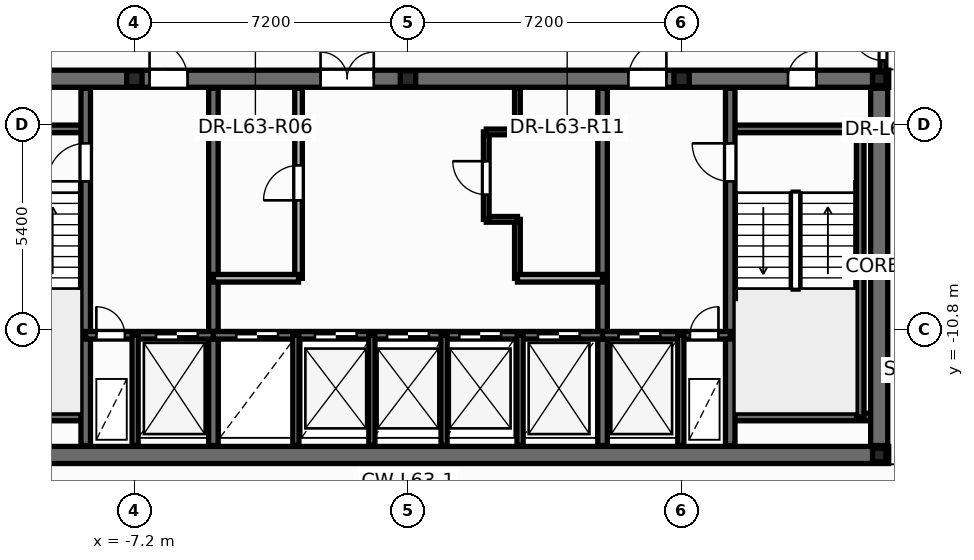
"""IFC4 building model, lengths in metres.
Left out: names, types, materials, properties, quantities, classifications, styles, units other than length and angle.
Written with IfcOpenShell. Run it as: python <this file> out.ifc"""

import sys

from ifc_helpers import new_model, si_unit, direction, frame, frame_2d, origin, origin_2d, place, context, subcontext, project, spatial, rectangle, i_section, extrude, element, fill, save


model = new_model("IFC4")
c1 = context("Model", 3, precision=1e-05, world=origin(), true_north=direction((0.0, 1.0)))
c2 = subcontext(c1, "Body", "Model", "MODEL_VIEW")
j1 = project(units=[si_unit("LENGTHUNIT", "METRE"), si_unit("PLANEANGLEUNIT", "RADIAN")], contexts=[c1])
p1 = place(None, origin())
s1 = spatial("IfcSite", under=j1, at=p1, CompositionType="ELEMENT")
p2 = place(p1, origin())
s2 = spatial("IfcBuilding", under=s1, at=p2, CompositionType="ELEMENT")
p3 = place(p2, frame((0.0, 0.0, 240.6)))
s3 = spatial("IfcBuildingStorey", under=s2, at=p3, CompositionType="ELEMENT", Elevation=240.6)
for number, where, z_axis, x_axis in (
    (1, (12.4, -14.1, 0.0), (0.0, 0.0, 1.0), (1.0, 0.0, 0.0)),
    (2, (12.4, -4.2, 0.0), (0.0, 0.0, 1.0), (1.0, 0.0, 0.0)),
):
    element("IfcColumn", number, at=place(p3, frame(where, z_axis=z_axis, x_axis=x_axis)), inside=s3, PredefinedType="COLUMN", context=c2, shape_type="SweptSolid", body=[
        extrude(i_section(OverallWidth=0.352, OverallDepth=0.359, WebThickness=0.018, FlangeThickness=0.026, at=origin_2d()), origin(), (0.0, 0.0, 1.0), 3.6),
    ])
for number, where, z_axis, x_axis in (
    (3, (-7.2, -4.2, 0.0), (0.0, 0.0, 1.0), (1.0, 0.0, 0.0)),
    (4, (0.0, -4.2, 0.0), (0.0, 0.0, 1.0), (1.0, 0.0, 0.0)),
    (5, (7.2, -4.2, 0.0), (0.0, 0.0, 1.0), (1.0, 0.0, 0.0)),
):
    element("IfcColumn", number, at=place(p3, frame(where, z_axis=z_axis, x_axis=x_axis)), inside=s3, PredefinedType="PILASTER", context=c2, shape_type="SweptSolid", body=[
        extrude(i_section(OverallWidth=0.405, OverallDepth=0.414, WebThickness=0.022, FlangeThickness=0.032, at=origin_2d()), origin(), (0.0, 0.0, 1.0), 3.6),
    ])
p4 = place(p3, frame((2.88, -9.45, 0.0), z_axis=(0.0, 0.0, 1.0), x_axis=(0.0, 1.0, 0.0)))
e6 = element("IfcWall", 6, at=p4, inside=s3, PredefinedType="PARTITIONING", context=c2, shape_type="SweptSolid", body=[
    extrude(rectangle(XDim=1.55, YDim=0.15, at=frame_2d((0.775, 0.0))), origin(), (0.0, 0.0, 1.0), 3.28),
])
p5 = place(p3, frame((2.06, -7.9, 0.0), z_axis=(0.0, 0.0, 1.0), x_axis=(1.0, 0.0, 0.0)))
e7 = element("IfcWall", 7, at=p5, inside=s3, PredefinedType="PARTITIONING", context=c2, shape_type="SweptSolid", body=[
    extrude(rectangle(XDim=0.82, YDim=0.15, at=frame_2d((0.41, 0.0))), origin(), (0.0, 0.0, 1.0), 3.28),
])
p6 = place(p3, frame((2.06, -7.9, 0.0), z_axis=(0.0, 0.0, 1.0), x_axis=(0.0, 1.0, 0.0)))
e8 = element("IfcWall", 8, at=p6, inside=s3, PredefinedType="PARTITIONING", context=c2, shape_type="SweptSolid", body=[
    extrude(rectangle(XDim=2.3, YDim=0.15, at=frame_2d((1.15, 0.0))), origin(), (0.0, 0.0, 1.0), 3.28),
])
p7 = place(p6, frame((0.65, 0.0, 0.0)))
e9 = element("IfcOpeningElement", 9, at=p7, cuts=e8, PredefinedType="OPENING", context=c2, shape_type="SweptSolid", body=[
    extrude(rectangle(XDim=0.886, YDim=2.104, at=frame_2d((0.44, 1.052))), frame((0.0, 0.085, 0.0), z_axis=(0.0, -1.0, 0.0), x_axis=(1.0, 0.0, 0.0)), (0.0, 0.0, 1.0), 0.17),
])
p8 = place(p3, frame((2.06, -5.6, 0.0), z_axis=(0.0, 0.0, 1.0), x_axis=(1.0, 0.0, 0.0)))
e10 = element("IfcWall", 10, at=p8, inside=s3, PredefinedType="PARTITIONING", context=c2, shape_type="SweptSolid", body=[
    extrude(rectangle(XDim=0.82, YDim=0.15, at=frame_2d((0.41, 0.0))), origin(), (0.0, 0.0, 1.0), 3.28),
])
p9 = place(p3, frame((2.88, -5.6, 0.0), z_axis=(0.0, 0.0, 1.0), x_axis=(0.0, 1.0, 0.0)))
e11 = element("IfcWall", 11, at=p9, inside=s3, PredefinedType="PARTITIONING", context=c2, shape_type="SweptSolid", body=[
    extrude(rectangle(XDim=1.15, YDim=0.15, at=frame_2d((0.575, 0.0))), origin(), (0.0, 0.0, 1.0), 3.28),
])
p10 = place(p3, frame((-12.65, -14.1, 0.0), z_axis=(0.0, 0.0, 1.0), x_axis=(1.0, 0.0, 0.0)))
e12 = element("IfcWall", 12, at=p10, inside=s3, PredefinedType="SHEAR", context=c2, shape_type="SweptSolid", body=[
    extrude(rectangle(XDim=25.3, YDim=0.45, at=frame_2d((12.65, 0.0))), origin(), (0.0, 0.0, 1.0), 3.6),
])
p11 = place(p3, frame((-12.65, -4.2, 0.0), z_axis=(0.0, 0.0, 1.0), x_axis=(1.0, 0.0, 0.0)))
e13 = element("IfcWall", 13, at=p11, inside=s3, PredefinedType="SHEAR", context=c2, shape_type="SweptSolid", body=[
    extrude(rectangle(XDim=25.3, YDim=0.45, at=frame_2d((12.65, 0.0))), origin(), (0.0, 0.0, 1.0), 3.6),
])
p12 = place(p11, frame((1.85, 0.0, 0.0)))
e14 = element("IfcOpeningElement", 14, at=p12, cuts=e13, PredefinedType="OPENING", context=c2, shape_type="SweptSolid", body=[
    extrude(rectangle(XDim=0.756, YDim=2.054, at=frame_2d((0.375, 1.027))), frame((0.0, 0.235, 0.0), z_axis=(0.0, -1.0, 0.0), x_axis=(1.0, 0.0, 0.0)), (0.0, 0.0, 1.0), 0.47),
])
p13 = place(p11, frame((22.65, 0.0, 0.0)))
e15 = element("IfcOpeningElement", 15, at=p13, cuts=e13, PredefinedType="OPENING", context=c2, shape_type="SweptSolid", body=[
    extrude(rectangle(XDim=0.756, YDim=2.054, at=frame_2d((0.375, 1.027))), frame((0.0, 0.235, 0.0), z_axis=(0.0, -1.0, 0.0), x_axis=(1.0, 0.0, 0.0)), (0.0, 0.0, 1.0), 0.47),
])
p14 = place(p11, frame((5.85, 0.0, 0.0)))
e16 = element("IfcOpeningElement", 16, at=p14, cuts=e13, PredefinedType="OPENING", context=c2, shape_type="SweptSolid", body=[
    extrude(rectangle(XDim=1.006, YDim=2.104, at=frame_2d((0.5, 1.052))), frame((0.0, 0.235, 0.0), z_axis=(0.0, -1.0, 0.0), x_axis=(1.0, 0.0, 0.0)), (0.0, 0.0, 1.0), 0.47),
])
p15 = place(p11, frame((10.35, 0.0, 0.0)))
e17 = element("IfcOpeningElement", 17, at=p15, cuts=e13, PredefinedType="OPENING", context=c2, shape_type="SweptSolid", body=[
    extrude(rectangle(XDim=1.406, YDim=2.154, at=frame_2d((0.7, 1.077))), frame((0.0, 0.235, 0.0), z_axis=(0.0, -1.0, 0.0), x_axis=(1.0, 0.0, 0.0)), (0.0, 0.0, 1.0), 0.47),
])
p16 = place(p11, frame((18.45, 0.0, 0.0)))
e18 = element("IfcOpeningElement", 18, at=p16, cuts=e13, PredefinedType="OPENING", context=c2, shape_type="SweptSolid", body=[
    extrude(rectangle(XDim=1.006, YDim=2.104, at=frame_2d((0.5, 1.052))), frame((0.0, 0.235, 0.0), z_axis=(0.0, -1.0, 0.0), x_axis=(1.0, 0.0, 0.0)), (0.0, 0.0, 1.0), 0.47),
])
for number, where, z_axis, x_axis in (
    (19, (-12.35, -5.52, 0.0), (0.0, 0.0, 1.0), (1.0, 0.0, 0.0)),
    (20, (-12.35, -13.1, 0.0), (0.0, 0.0, 1.0), (1.0, 0.0, 0.0)),
    (21, (8.48, -5.52, 0.0), (0.0, 0.0, 1.0), (1.0, 0.0, 0.0)),
    (22, (8.48, -13.1, 0.0), (0.0, 0.0, 1.0), (1.0, 0.0, 0.0)),
):
    element("IfcWall", number, at=place(p3, frame(where, z_axis=z_axis, x_axis=x_axis)), inside=s3, PredefinedType="SOLIDWALL", context=c2, shape_type="SweptSolid", body=[
        extrude(rectangle(XDim=3.87, YDim=0.2, at=frame_2d((1.935, 0.0))), origin(), (0.0, 0.0, 1.0), 3.6),
    ])
p17 = place(p3, frame((11.9, -13.1, 0.0), z_axis=(0.0, 0.0, 1.0), x_axis=(0.0, 1.0, 0.0)))
e23 = element("IfcWall", 23, at=p17, inside=s3, PredefinedType="SOLIDWALL", context=c2, shape_type="SweptSolid", body=[
    extrude(rectangle(XDim=7.58, YDim=0.2, at=frame_2d((3.79, 0.0))), origin(), (0.0, 0.0, 1.0), 3.6),
])
p18 = place(p3, frame((-8.48, -13.85, 0.0), z_axis=(0.0, 0.0, 1.0), x_axis=(0.0, 1.0, 0.0)))
e24 = element("IfcWall", 24, at=p18, inside=s3, PredefinedType="SHEAR", context=c2, shape_type="SweptSolid", body=[
    extrude(rectangle(XDim=9.4, YDim=0.25, at=frame_2d((4.7, 0.0))), origin(), (0.0, 0.0, 1.0), 3.6),
])
p19 = place(p18, frame((6.95, 0.0, 0.0)))
e25 = element("IfcOpeningElement", 25, at=p19, cuts=e24, PredefinedType="OPENING", context=c2, shape_type="SweptSolid", body=[
    extrude(rectangle(XDim=1.006, YDim=2.104, at=frame_2d((0.5, 1.052))), frame((0.0, 0.135, 0.0), z_axis=(0.0, -1.0, 0.0), x_axis=(1.0, 0.0, 0.0)), (0.0, 0.0, 1.0), 0.27),
])
p20 = place(p3, frame((8.48, -13.85, 0.0), z_axis=(0.0, 0.0, 1.0), x_axis=(0.0, 1.0, 0.0)))
e26 = element("IfcWall", 26, at=p20, inside=s3, PredefinedType="SHEAR", context=c2, shape_type="SweptSolid", body=[
    extrude(rectangle(XDim=9.4, YDim=0.25, at=frame_2d((4.7, 0.0))), origin(), (0.0, 0.0, 1.0), 3.6),
])
p21 = place(p20, frame((6.95, 0.0, 0.0)))
e27 = element("IfcOpeningElement", 27, at=p21, cuts=e26, PredefinedType="OPENING", context=c2, shape_type="SweptSolid", body=[
    extrude(rectangle(XDim=1.006, YDim=2.104, at=frame_2d((0.5, 1.052))), frame((0.0, 0.135, 0.0), z_axis=(0.0, -1.0, 0.0), x_axis=(1.0, 0.0, 0.0)), (0.0, 0.0, 1.0), 0.27),
])
for number, where, z_axis, x_axis in (
    (28, (-5.12, -13.85, 0.0), (0.0, 0.0, 1.0), (0.0, 1.0, 0.0)),
    (29, (5.12, -13.85, 0.0), (0.0, 0.0, 1.0), (0.0, 1.0, 0.0)),
):
    element("IfcWall", number, at=place(p3, frame(where, z_axis=z_axis, x_axis=x_axis)), inside=s3, PredefinedType="SHEAR", context=c2, shape_type="SweptSolid", body=[
        extrude(rectangle(XDim=9.4, YDim=0.25, at=frame_2d((4.7, 0.0))), origin(), (0.0, 0.0, 1.0), 3.6),
    ])
p22 = place(p3, frame((-8.48, -10.95, 0.0), z_axis=(0.0, 0.0, 1.0), x_axis=(1.0, 0.0, 0.0)))
e30 = element("IfcWall", 30, at=p22, inside=s3, PredefinedType="SOLIDWALL", context=c2, shape_type="SweptSolid", body=[
    extrude(rectangle(XDim=3.36, YDim=0.2, at=frame_2d((1.68, 0.0))), origin(), (0.0, 0.0, 1.0), 3.6),
])
p23 = place(p22, frame((0.28, 0.0, 0.0)))
e31 = element("IfcOpeningElement", 31, at=p23, cuts=e30, PredefinedType="OPENING", context=c2, shape_type="SweptSolid", body=[
    extrude(rectangle(XDim=0.756, YDim=2.054, at=frame_2d((0.375, 1.027))), frame((0.0, 0.11, 0.0), z_axis=(0.0, -1.0, 0.0), x_axis=(1.0, 0.0, 0.0)), (0.0, 0.0, 1.0), 0.22),
])
p24 = place(p22, frame((1.85, 0.0, 0.0)))
e32 = element("IfcOpeningElement", 32, at=p24, cuts=e30, PredefinedType="OPENING", context=c2, shape_type="SweptSolid", body=[
    extrude(rectangle(XDim=1.106, YDim=2.104, at=frame_2d((0.55, 1.052))), frame((0.0, 0.11, 0.0), z_axis=(0.0, -1.0, 0.0), x_axis=(1.0, 0.0, 0.0)), (0.0, 0.0, 1.0), 0.22),
])
p25 = place(p3, frame((-5.12, -10.95, 0.0), z_axis=(0.0, 0.0, 1.0), x_axis=(1.0, 0.0, 0.0)))
e33 = element("IfcWall", 33, at=p25, inside=s3, PredefinedType="SOLIDWALL", context=c2, shape_type="SweptSolid", body=[
    extrude(rectangle(XDim=10.24, YDim=0.2, at=frame_2d((5.12, 0.0))), origin(), (0.0, 0.0, 1.0), 3.6),
])
p26 = place(p25, frame((0.6, 0.0, 0.0)))
e34 = element("IfcOpeningElement", 34, at=p26, cuts=e33, PredefinedType="OPENING", context=c2, shape_type="SweptSolid", body=[
    extrude(rectangle(XDim=1.106, YDim=2.104, at=frame_2d((0.55, 1.052))), frame((0.0, 0.11, 0.0), z_axis=(0.0, -1.0, 0.0), x_axis=(1.0, 0.0, 0.0)), (0.0, 0.0, 1.0), 0.22),
])
p27 = place(p25, frame((2.67, 0.0, 0.0)))
e35 = element("IfcOpeningElement", 35, at=p27, cuts=e33, PredefinedType="OPENING", context=c2, shape_type="SweptSolid", body=[
    extrude(rectangle(XDim=1.106, YDim=2.104, at=frame_2d((0.55, 1.052))), frame((0.0, 0.11, 0.0), z_axis=(0.0, -1.0, 0.0), x_axis=(1.0, 0.0, 0.0)), (0.0, 0.0, 1.0), 0.22),
])
p28 = place(p25, frame((4.57, 0.0, 0.0)))
e36 = element("IfcOpeningElement", 36, at=p28, cuts=e33, PredefinedType="OPENING", context=c2, shape_type="SweptSolid", body=[
    extrude(rectangle(XDim=1.106, YDim=2.104, at=frame_2d((0.55, 1.052))), frame((0.0, 0.11, 0.0), z_axis=(0.0, -1.0, 0.0), x_axis=(1.0, 0.0, 0.0)), (0.0, 0.0, 1.0), 0.22),
])
p29 = place(p25, frame((6.47, 0.0, 0.0)))
e37 = element("IfcOpeningElement", 37, at=p29, cuts=e33, PredefinedType="OPENING", context=c2, shape_type="SweptSolid", body=[
    extrude(rectangle(XDim=1.106, YDim=2.104, at=frame_2d((0.55, 1.052))), frame((0.0, 0.11, 0.0), z_axis=(0.0, -1.0, 0.0), x_axis=(1.0, 0.0, 0.0)), (0.0, 0.0, 1.0), 0.22),
])
p30 = place(p25, frame((8.54, 0.0, 0.0)))
e38 = element("IfcOpeningElement", 38, at=p30, cuts=e33, PredefinedType="OPENING", context=c2, shape_type="SweptSolid", body=[
    extrude(rectangle(XDim=1.106, YDim=2.104, at=frame_2d((0.55, 1.052))), frame((0.0, 0.11, 0.0), z_axis=(0.0, -1.0, 0.0), x_axis=(1.0, 0.0, 0.0)), (0.0, 0.0, 1.0), 0.22),
])
p31 = place(p3, frame((5.12, -10.95, 0.0), z_axis=(0.0, 0.0, 1.0), x_axis=(1.0, 0.0, 0.0)))
e39 = element("IfcWall", 39, at=p31, inside=s3, PredefinedType="SOLIDWALL", context=c2, shape_type="SweptSolid", body=[
    extrude(rectangle(XDim=3.36, YDim=0.2, at=frame_2d((1.68, 0.0))), origin(), (0.0, 0.0, 1.0), 3.6),
])
p32 = place(p31, frame((0.42, 0.0, 0.0)))
e40 = element("IfcOpeningElement", 40, at=p32, cuts=e39, PredefinedType="OPENING", context=c2, shape_type="SweptSolid", body=[
    extrude(rectangle(XDim=1.106, YDim=2.104, at=frame_2d((0.55, 1.052))), frame((0.0, 0.11, 0.0), z_axis=(0.0, -1.0, 0.0), x_axis=(1.0, 0.0, 0.0)), (0.0, 0.0, 1.0), 0.22),
])
p33 = place(p31, frame((2.3, 0.0, 0.0)))
e41 = element("IfcOpeningElement", 41, at=p33, cuts=e39, PredefinedType="OPENING", context=c2, shape_type="SweptSolid", body=[
    extrude(rectangle(XDim=0.756, YDim=2.054, at=frame_2d((0.375, 1.027))), frame((0.0, 0.11, 0.0), z_axis=(0.0, -1.0, 0.0), x_axis=(1.0, 0.0, 0.0)), (0.0, 0.0, 1.0), 0.22),
])
for number, where, z_axis, x_axis in (
    (42, (-7.18, -13.85, 0.0), (0.0, 0.0, 1.0), (0.0, 1.0, 0.0)),
    (43, (7.18, -13.85, 0.0), (0.0, 0.0, 1.0), (0.0, 1.0, 0.0)),
    (44, (-2.95, -13.85, 0.0), (0.0, 0.0, 1.0), (0.0, 1.0, 0.0)),
    (45, (2.95, -13.85, 0.0), (0.0, 0.0, 1.0), (0.0, 1.0, 0.0)),
):
    element("IfcWall", number, at=place(p3, frame(where, z_axis=z_axis, x_axis=x_axis)), inside=s3, PredefinedType="PARTITIONING", context=c2, shape_type="SweptSolid", body=[
        extrude(rectangle(XDim=2.9, YDim=0.16, at=frame_2d((1.45, 0.0))), origin(), (0.0, 0.0, 1.0), 2.505),
    ])
p34 = place(p3, frame((12.4, -13.85, 0.0), z_axis=(0.0, 0.0, 1.0), x_axis=(0.0, 1.0, 0.0)))
e46 = element("IfcWall", 46, at=p34, inside=s3, PredefinedType="SHEAR", context=c2, shape_type="SweptSolid", body=[
    extrude(rectangle(XDim=9.4, YDim=0.45, at=frame_2d((4.7, 0.0))), origin(), (0.0, 0.0, 1.0), 3.6),
])
p35 = place(p3, frame((-2.88, -9.45, 0.0), z_axis=(0.0, 0.0, 1.0), x_axis=(0.0, 1.0, 0.0)))
e47 = element("IfcWall", 47, at=p35, inside=s3, PredefinedType="SOLIDWALL", context=c2, shape_type="SweptSolid", body=[
    extrude(rectangle(XDim=5.0, YDim=0.2, at=frame_2d((2.5, 0.0))), origin(), (0.0, 0.0, 1.0), 3.28),
])
p36 = place(p35, frame((2.05, 0.0, 0.0)))
e48 = element("IfcOpeningElement", 48, at=p36, cuts=e47, PredefinedType="OPENING", context=c2, shape_type="SweptSolid", body=[
    extrude(rectangle(XDim=0.926, YDim=2.104, at=frame_2d((0.46, 1.052))), frame((0.0, 0.11, 0.0), z_axis=(0.0, -1.0, 0.0), x_axis=(1.0, 0.0, 0.0)), (0.0, 0.0, 1.0), 0.22),
])
for number, where, z_axis, x_axis in (
    (49, (-5.12, -9.45, 0.0), (0.0, 0.0, 1.0), (1.0, 0.0, 0.0)),
    (50, (2.88, -9.45, 0.0), (0.0, 0.0, 1.0), (1.0, 0.0, 0.0)),
):
    element("IfcWall", number, at=place(p3, frame(where, z_axis=z_axis, x_axis=x_axis)), inside=s3, PredefinedType="SOLIDWALL", context=c2, shape_type="SweptSolid", body=[
        extrude(rectangle(XDim=2.24, YDim=0.2, at=frame_2d((1.12, 0.0))), origin(), (0.0, 0.0, 1.0), 3.28),
    ])
for number, where, z_axis, x_axis in (
    (51, (-0.95, -13.85, 0.0), (0.0, 0.0, 1.0), (0.0, 1.0, 0.0)),
    (52, (0.95, -13.85, 0.0), (0.0, 0.0, 1.0), (0.0, 1.0, 0.0)),
):
    element("IfcWall", number, at=place(p3, frame(where, z_axis=z_axis, x_axis=x_axis)), inside=s3, PredefinedType="PARTITIONING", context=c2, shape_type="SweptSolid", body=[
        extrude(rectangle(XDim=2.9, YDim=0.16, at=frame_2d((1.45, 0.0))), origin(), (0.0, 0.0, 1.0), 2.505),
    ])
p37 = place(p3, frame((12.5, -4.24, 0.0), z_axis=(0.0, 0.0, 1.0), x_axis=(0.0, 1.0, 0.0)))
e53 = element("IfcWall", 53, at=p37, inside=s3, PredefinedType="PARTITIONING", context=c2, shape_type="SweptSolid", body=[
    extrude(rectangle(XDim=1.48, YDim=0.15, at=frame_2d((0.74, 0.0))), origin(), (0.0, 0.0, 1.0), 2.255),
])
p38 = place(p37, frame((0.522, 0.0, 0.0)))
e54 = element("IfcOpeningElement", 54, at=p38, cuts=e53, PredefinedType="OPENING", context=c2, shape_type="SweptSolid", body=[
    extrude(rectangle(XDim=0.826, YDim=2.104, at=frame_2d((0.41, 1.052))), frame((0.0, 0.085, 0.0), z_axis=(0.0, -1.0, 0.0), x_axis=(1.0, 0.0, 0.0)), (0.0, 0.0, 1.0), 0.17),
])
p39 = place(p36, origin())
e55 = element("IfcDoor", 55, at=p39, inside=s3, OperationType="SINGLE_SWING_LEFT", PredefinedType="DOOR", context=c2, shape_type="SweptSolid", body=[
    extrude(rectangle(XDim=0.92, YDim=2.1, at=frame_2d((0.46, 1.05))), frame((0.0, 0.025, 0.0), z_axis=(0.0, -1.0, 0.0), x_axis=(1.0, 0.0, 0.0)), (0.0, 0.0, 1.0), 0.05),
])
fill(e48, e55)
p40 = place(p7, origin())
e56 = element("IfcDoor", 56, at=p40, inside=s3, OperationType="SINGLE_SWING_RIGHT", PredefinedType="DOOR", context=c2, shape_type="SweptSolid", body=[
    extrude(rectangle(XDim=0.88, YDim=2.1, at=frame_2d((0.44, 1.05))), frame((0.0, 0.025, 0.0), z_axis=(0.0, -1.0, 0.0), x_axis=(1.0, 0.0, 0.0)), (0.0, 0.0, 1.0), 0.05),
])
fill(e9, e56)
p41 = place(p19, origin())
e57 = element("IfcDoor", 57, at=p41, inside=s3, OperationType="SINGLE_SWING_LEFT", PredefinedType="DOOR", context=c2, shape_type="SweptSolid", body=[
    extrude(rectangle(XDim=1.0, YDim=2.1, at=frame_2d((0.5, 1.05))), frame((0.0, 0.025, 0.0), z_axis=(0.0, -1.0, 0.0), x_axis=(1.0, 0.0, 0.0)), (0.0, 0.0, 1.0), 0.05),
])
fill(e25, e57)
p42 = place(p21, origin())
e58 = element("IfcDoor", 58, at=p42, inside=s3, OperationType="SINGLE_SWING_RIGHT", PredefinedType="DOOR", context=c2, shape_type="SweptSolid", body=[
    extrude(rectangle(XDim=1.0, YDim=2.1, at=frame_2d((0.5, 1.05))), frame((0.0, 0.025, 0.0), z_axis=(0.0, -1.0, 0.0), x_axis=(1.0, 0.0, 0.0)), (0.0, 0.0, 1.0), 0.05),
])
fill(e27, e58)
p43 = place(p23, origin())
e59 = element("IfcDoor", 59, at=p43, inside=s3, OperationType="SINGLE_SWING_LEFT", PredefinedType="DOOR", context=c2, shape_type="SweptSolid", body=[
    extrude(rectangle(XDim=0.75, YDim=2.05, at=frame_2d((0.375, 1.025))), frame((0.0, 0.025, 0.0), z_axis=(0.0, -1.0, 0.0), x_axis=(1.0, 0.0, 0.0)), (0.0, 0.0, 1.0), 0.05),
])
fill(e31, e59)
p44 = place(p24, origin())
e60 = element("IfcDoor", 60, at=p44, inside=s3, OperationType="DOUBLE_DOOR_SLIDING", PredefinedType="DOOR", context=c2, shape_type="SweptSolid", body=[
    extrude(rectangle(XDim=1.1, YDim=2.1, at=frame_2d((0.55, 1.05))), frame((0.0, 0.025, 0.0), z_axis=(0.0, -1.0, 0.0), x_axis=(1.0, 0.0, 0.0)), (0.0, 0.0, 1.0), 0.05),
])
fill(e32, e60)
p45 = place(p32, origin())
e61 = element("IfcDoor", 61, at=p45, inside=s3, OperationType="DOUBLE_DOOR_SLIDING", PredefinedType="DOOR", context=c2, shape_type="SweptSolid", body=[
    extrude(rectangle(XDim=1.1, YDim=2.1, at=frame_2d((0.55, 1.05))), frame((0.0, 0.025, 0.0), z_axis=(0.0, -1.0, 0.0), x_axis=(1.0, 0.0, 0.0)), (0.0, 0.0, 1.0), 0.05),
])
fill(e40, e61)
p46 = place(p33, origin())
e62 = element("IfcDoor", 62, at=p46, inside=s3, OperationType="SINGLE_SWING_RIGHT", PredefinedType="DOOR", context=c2, shape_type="SweptSolid", body=[
    extrude(rectangle(XDim=0.75, YDim=2.05, at=frame_2d((0.375, 1.025))), frame((0.0, 0.025, 0.0), z_axis=(0.0, -1.0, 0.0), x_axis=(1.0, 0.0, 0.0)), (0.0, 0.0, 1.0), 0.05),
])
fill(e41, e62)
p47 = place(p26, origin())
e63 = element("IfcDoor", 63, at=p47, inside=s3, OperationType="DOUBLE_DOOR_SLIDING", PredefinedType="DOOR", context=c2, shape_type="SweptSolid", body=[
    extrude(rectangle(XDim=1.1, YDim=2.1, at=frame_2d((0.55, 1.05))), frame((0.0, 0.025, 0.0), z_axis=(0.0, -1.0, 0.0), x_axis=(1.0, 0.0, 0.0)), (0.0, 0.0, 1.0), 0.05),
])
fill(e34, e63)
p48 = place(p27, origin())
e64 = element("IfcDoor", 64, at=p48, inside=s3, OperationType="DOUBLE_DOOR_SLIDING", PredefinedType="DOOR", context=c2, shape_type="SweptSolid", body=[
    extrude(rectangle(XDim=1.1, YDim=2.1, at=frame_2d((0.55, 1.05))), frame((0.0, 0.025, 0.0), z_axis=(0.0, -1.0, 0.0), x_axis=(1.0, 0.0, 0.0)), (0.0, 0.0, 1.0), 0.05),
])
fill(e35, e64)
p49 = place(p28, origin())
e65 = element("IfcDoor", 65, at=p49, inside=s3, OperationType="DOUBLE_DOOR_SLIDING", PredefinedType="DOOR", context=c2, shape_type="SweptSolid", body=[
    extrude(rectangle(XDim=1.1, YDim=2.1, at=frame_2d((0.55, 1.05))), frame((0.0, 0.025, 0.0), z_axis=(0.0, -1.0, 0.0), x_axis=(1.0, 0.0, 0.0)), (0.0, 0.0, 1.0), 0.05),
])
fill(e36, e65)
p50 = place(p29, origin())
e66 = element("IfcDoor", 66, at=p50, inside=s3, OperationType="DOUBLE_DOOR_SLIDING", PredefinedType="DOOR", context=c2, shape_type="SweptSolid", body=[
    extrude(rectangle(XDim=1.1, YDim=2.1, at=frame_2d((0.55, 1.05))), frame((0.0, 0.025, 0.0), z_axis=(0.0, -1.0, 0.0), x_axis=(1.0, 0.0, 0.0)), (0.0, 0.0, 1.0), 0.05),
])
fill(e37, e66)
p51 = place(p30, origin())
e67 = element("IfcDoor", 67, at=p51, inside=s3, OperationType="DOUBLE_DOOR_SLIDING", PredefinedType="DOOR", context=c2, shape_type="SweptSolid", body=[
    extrude(rectangle(XDim=1.1, YDim=2.1, at=frame_2d((0.55, 1.05))), frame((0.0, 0.025, 0.0), z_axis=(0.0, -1.0, 0.0), x_axis=(1.0, 0.0, 0.0)), (0.0, 0.0, 1.0), 0.05),
])
fill(e38, e67)
p52 = place(p13, origin())
e68 = element("IfcDoor", 68, at=p52, inside=s3, OperationType="SINGLE_SWING_RIGHT", PredefinedType="DOOR", context=c2, shape_type="SweptSolid", body=[
    extrude(rectangle(XDim=0.75, YDim=2.05, at=frame_2d((0.375, 1.025))), frame((0.0, 0.025, 0.0), z_axis=(0.0, -1.0, 0.0), x_axis=(1.0, 0.0, 0.0)), (0.0, 0.0, 1.0), 0.05),
])
fill(e15, e68)
p53 = place(p14, origin())
e69 = element("IfcDoor", 69, at=p53, inside=s3, OperationType="SINGLE_SWING_LEFT", PredefinedType="DOOR", context=c2, shape_type="SweptSolid", body=[
    extrude(rectangle(XDim=1.0, YDim=2.1, at=frame_2d((0.5, 1.05))), frame((0.0, 0.025, 0.0), z_axis=(0.0, -1.0, 0.0), x_axis=(1.0, 0.0, 0.0)), (0.0, 0.0, 1.0), 0.05),
])
fill(e16, e69)
p54 = place(p15, origin())
e70 = element("IfcDoor", 70, at=p54, inside=s3, OperationType="DOUBLE_DOOR_SINGLE_SWING", PredefinedType="DOOR", context=c2, shape_type="SweptSolid", body=[
    extrude(rectangle(XDim=1.4, YDim=2.15, at=frame_2d((0.7, 1.075))), frame((0.0, 0.025, 0.0), z_axis=(0.0, -1.0, 0.0), x_axis=(1.0, 0.0, 0.0)), (0.0, 0.0, 1.0), 0.05),
])
fill(e17, e70)
p55 = place(p16, origin())
e71 = element("IfcDoor", 71, at=p55, inside=s3, OperationType="SINGLE_SWING_RIGHT", PredefinedType="DOOR", context=c2, shape_type="SweptSolid", body=[
    extrude(rectangle(XDim=1.0, YDim=2.1, at=frame_2d((0.5, 1.05))), frame((0.0, 0.025, 0.0), z_axis=(0.0, -1.0, 0.0), x_axis=(1.0, 0.0, 0.0)), (0.0, 0.0, 1.0), 0.05),
])
fill(e18, e71)
p56 = place(p38, origin())
e72 = element("IfcDoor", 72, at=p56, inside=s3, OperationType="SINGLE_SWING_RIGHT", PredefinedType="DOOR", context=c2, shape_type="SweptSolid", body=[
    extrude(rectangle(XDim=0.82, YDim=2.1, at=frame_2d((0.41, 1.05))), frame((0.0, 0.025, 0.0), z_axis=(0.0, -1.0, 0.0), x_axis=(1.0, 0.0, 0.0)), (0.0, 0.0, 1.0), 0.05),
])
fill(e54, e72)
save(model, sys.argv[1])
